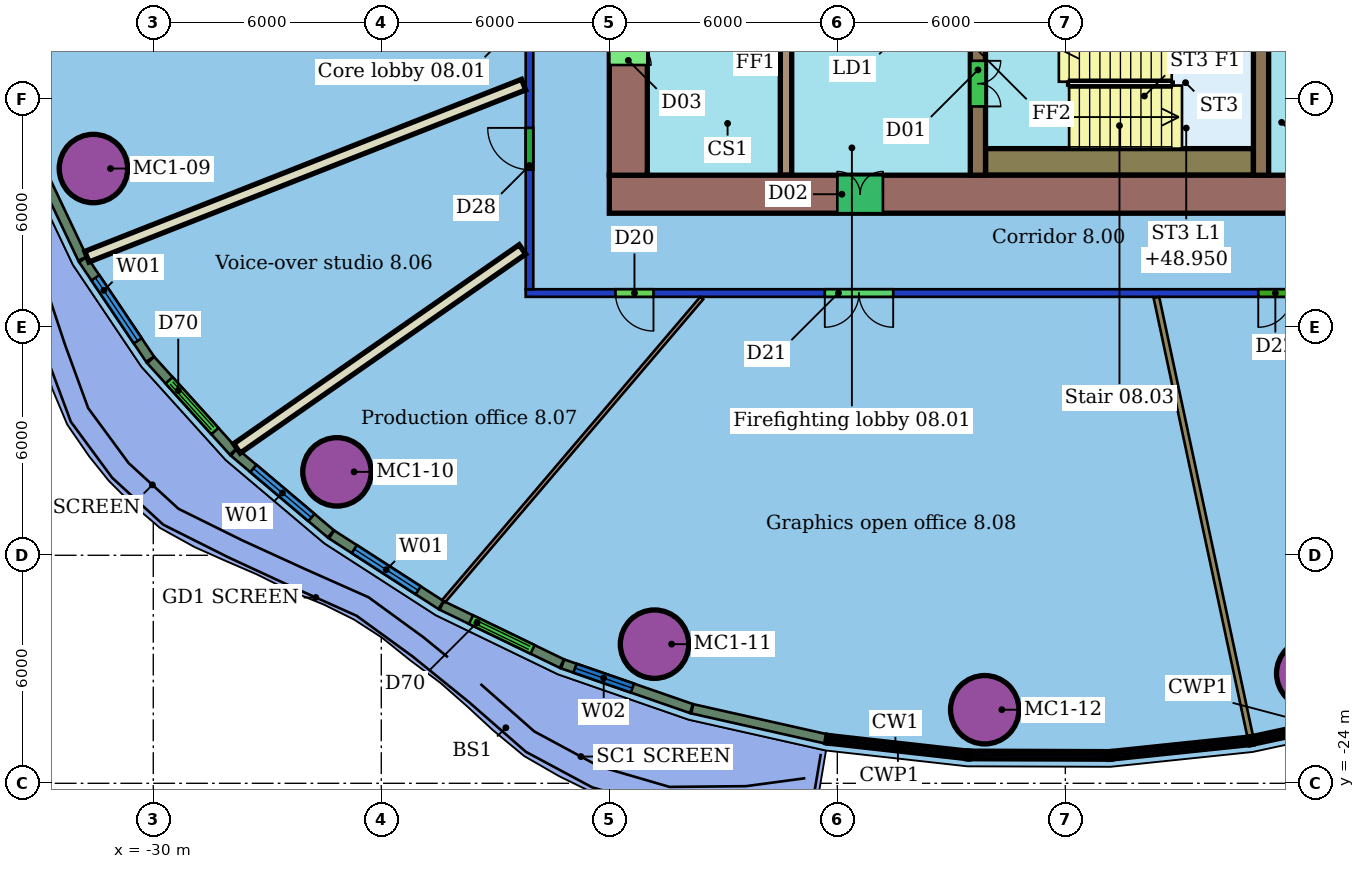
"""IFC4 building model, lengths in metres.
Left out: names, types, materials, properties, quantities, classifications, styles, units other than length and angle.
Written with IfcOpenShell. Run it as: python <this file> out.ifc"""

import sys

from ifc_helpers import new_model, si_unit, direction, frame, frame_2d, origin, origin_2d, place, context, subcontext, project, spatial, rectangle, hollow_circle, extrude, element, fill, save


model = new_model("IFC4")
c1 = context("Model", 3, precision=1e-05, world=origin(), true_north=direction((0.0, 1.0)))
c2 = subcontext(c1, "Body", "Model", "MODEL_VIEW")
j1 = project(units=[si_unit("LENGTHUNIT", "METRE"), si_unit("PLANEANGLEUNIT", "RADIAN")], contexts=[c1])
p1 = place(None, origin())
s1 = spatial("IfcSite", under=j1, at=p1, CompositionType="ELEMENT")
p2 = place(p1, origin())
s2 = spatial("IfcBuilding", under=s1, at=p2, CompositionType="ELEMENT")
p3 = place(p2, frame((0.0, 0.0, 47.1)))
s3 = spatial("IfcBuildingStorey", under=s2, at=p3, CompositionType="ELEMENT", Elevation=47.1)
for number, where, z_axis, x_axis in (
    (1, (-31.575, -7.824, 0.0), (0.0, 0.0, 1.0), (1.0, 0.0, 0.0)),
    (2, (-25.166, -15.805, 0.0), (0.0, 0.0, 1.0), (1.0, 0.0, 0.0)),
    (3, (-16.81, -20.339, 0.0), (0.0, 0.0, 1.0), (1.0, 0.0, 0.0)),
    (4, (-8.121, -22.064, 0.0), (0.0, 0.0, 1.0), (1.0, 0.0, 0.0)),
    (5, (0.458, -21.108, 0.0), (0.0, 0.0, 1.0), (1.0, 0.0, 0.0)),
):
    element("IfcColumn", number, at=place(p3, frame(where, z_axis=z_axis, x_axis=x_axis)), inside=s3, PredefinedType="COLUMN", context=c2, shape_type="SweptSolid", body=[
        extrude(hollow_circle(Radius=0.9, WallThickness=0.06, at=origin_2d()), origin(), (0.0, 0.0, 1.0), 3.55),
    ])
p4 = place(p3, frame((8.2, -11.1, 0.0), z_axis=(0.0, 0.0, 1.0), x_axis=(-1.0, 0.0, 0.0)))
e6 = element("IfcWall", 6, at=p4, inside=s3, PredefinedType="PARTITIONING", context=c2, shape_type="SweptSolid", body=[
    extrude(rectangle(XDim=28.4, YDim=0.2, at=frame_2d((14.2, 0.0))), origin(), (0.0, 0.0, 1.0), 2.85),
])
p5 = place(p4, frame((25.038, 0.0, 0.0)))
e7 = element("IfcOpeningElement", 7, at=p5, cuts=e6, PredefinedType="OPENING", context=c2, shape_type="SweptSolid", body=[
    extrude(rectangle(XDim=1.0, YDim=2.1, at=frame_2d((0.5, 1.05))), frame((0.0, 0.11, 0.0), z_axis=(0.0, -1.0, 0.0), x_axis=(1.0, 0.0, 0.0)), (0.0, 0.0, 1.0), 0.22),
])
p6 = place(p4, frame((18.73, 0.0, 0.0)))
e8 = element("IfcOpeningElement", 8, at=p6, cuts=e6, PredefinedType="OPENING", context=c2, shape_type="SweptSolid", body=[
    extrude(rectangle(XDim=1.8, YDim=2.1, at=frame_2d((0.9, 1.05))), frame((0.0, 0.11, 0.0), z_axis=(0.0, -1.0, 0.0), x_axis=(1.0, 0.0, 0.0)), (0.0, 0.0, 1.0), 0.22),
])
p7 = place(p4, frame((8.223, 0.0, 0.0)))
e9 = element("IfcOpeningElement", 9, at=p7, cuts=e6, PredefinedType="OPENING", context=c2, shape_type="SweptSolid", body=[
    extrude(rectangle(XDim=0.9, YDim=2.1, at=frame_2d((0.45, 1.05))), frame((0.0, 0.11, 0.0), z_axis=(0.0, -1.0, 0.0), x_axis=(1.0, 0.0, 0.0)), (0.0, 0.0, 1.0), 0.22),
])
p8 = place(p3, frame((-20.1, -11.0, 0.0), z_axis=(0.0, 0.0, 1.0), x_axis=(0.0, 1.0, 0.0)))
e10 = element("IfcWall", 10, at=p8, inside=s3, PredefinedType="PARTITIONING", context=c2, shape_type="SweptSolid", body=[
    extrude(rectangle(XDim=22.0, YDim=0.2, at=frame_2d((11.0, 0.0))), origin(), (0.0, 0.0, 1.0), 2.85),
])
p9 = place(p8, frame((8.49, 0.0, 0.0)))
e11 = element("IfcOpeningElement", 11, at=p9, cuts=e10, PredefinedType="OPENING", context=c2, shape_type="SweptSolid", body=[
    extrude(rectangle(XDim=1.8, YDim=2.1, at=frame_2d((0.9, 1.05))), frame((0.0, 0.11, 0.0), z_axis=(0.0, -1.0, 0.0), x_axis=(1.0, 0.0, 0.0)), (0.0, 0.0, 1.0), 0.22),
])
p10 = place(p8, frame((3.146, 0.0, 0.0)))
e12 = element("IfcOpeningElement", 12, at=p10, cuts=e10, PredefinedType="OPENING", context=c2, shape_type="SweptSolid", body=[
    extrude(rectangle(XDim=1.1, YDim=2.1, at=frame_2d((0.55, 1.05))), frame((0.0, 0.11, 0.0), z_axis=(0.0, -1.0, 0.0), x_axis=(1.0, 0.0, 0.0)), (0.0, 0.0, 1.0), 0.22),
])
p11 = place(p3, frame((-31.747, -10.144, 0.0), z_axis=(0.0, 0.0, 1.0), x_axis=(0.930393072446, 0.366563406172, 0.0)))
e13 = element("IfcWall", 13, at=p11, inside=s3, PredefinedType="PARTITIONING", context=c2, shape_type="SweptSolid", body=[
    extrude(rectangle(XDim=12.352, YDim=0.3, at=frame_2d((6.176, 0.0))), origin(), (0.0, 0.0, 1.0), 3.55),
])
p12 = place(p3, frame((-27.799, -15.188, 0.0), z_axis=(0.0, 0.0, 1.0), x_axis=(0.820483813594, 0.571669757491, 0.0)))
e14 = element("IfcWall", 14, at=p12, inside=s3, PredefinedType="PARTITIONING", context=c2, shape_type="SweptSolid", body=[
    extrude(rectangle(XDim=9.157, YDim=0.3, at=frame_2d((4.578, 0.0))), origin(), (0.0, 0.0, 1.0), 3.55),
])
p13 = place(p3, frame((-22.359, -19.206, 0.0), z_axis=(0.0, 0.0, 1.0), x_axis=(0.648419428032, 0.761283288501, 0.0)))
e15 = element("IfcWall", 15, at=p13, inside=s3, PredefinedType="PARTITIONING", context=c2, shape_type="SweptSolid", body=[
    extrude(rectangle(XDim=10.474, YDim=0.1, at=frame_2d((5.237, 0.0))), origin(), (0.0, 0.0, 1.0), 3.55),
])
p14 = place(p3, frame((-1.138, -22.756, 0.0), z_axis=(0.0, 0.0, 1.0), x_axis=(-0.208954012669, 0.977925467809, 0.0)))
e16 = element("IfcWall", 16, at=p14, inside=s3, PredefinedType="PARTITIONING", context=c2, shape_type="SweptSolid", body=[
    extrude(rectangle(XDim=11.801, YDim=0.15, at=frame_2d((5.9, 0.0))), origin(), (0.0, 0.0, 1.0), 3.55),
])
p15 = place(p3, frame((-33.168, -7.439, 0.0), z_axis=(0.0, 0.0, 1.0), x_axis=(0.428609341076, -0.903489918451, 0.0)))
e17 = element("IfcWall", 17, at=p15, inside=s3, PredefinedType="SOLIDWALL", context=c2, shape_type="SweptSolid", body=[
    extrude(rectangle(XDim=3.05, YDim=0.25, at=frame_2d((1.525, 0.0))), origin(), (0.0, 0.0, 1.0), 3.15),
])
p16 = place(p3, frame((-31.848, -10.217, 0.0), z_axis=(0.0, 0.0, 1.0), x_axis=(0.558028768247, -0.829821603605, 0.0)))
e18 = element("IfcWall", 18, at=p16, inside=s3, PredefinedType="SOLIDWALL", context=c2, shape_type="SweptSolid", body=[
    extrude(rectangle(XDim=3.161, YDim=0.25, at=frame_2d((1.581, 0.0))), origin(), (0.0, 0.0, 1.0), 3.15),
])
p17 = place(p16, frame((0.58, 0.0, 0.8)))
e19 = element("IfcOpeningElement", 19, at=p17, cuts=e18, PredefinedType="OPENING", context=c2, shape_type="SweptSolid", body=[
    extrude(rectangle(XDim=2.0, YDim=2.2, at=frame_2d((1.0, 1.1))), frame((0.0, 0.135, 0.0), z_axis=(0.0, -1.0, 0.0), x_axis=(1.0, 0.0, 0.0)), (0.0, 0.0, 1.0), 0.27),
])
p18 = place(p3, frame((-30.068, -12.861, 0.0), z_axis=(0.0, 0.0, 1.0), x_axis=(0.670103092784, -0.742268041237, 0.0)))
e20 = element("IfcWall", 20, at=p18, inside=s3, PredefinedType="SOLIDWALL", context=c2, shape_type="SweptSolid", body=[
    extrude(rectangle(XDim=3.244, YDim=0.25, at=frame_2d((1.622, 0.0))), origin(), (0.0, 0.0, 1.0), 3.15),
])
p19 = place(p18, frame((0.722, 0.0, 0.0)))
e21 = element("IfcOpeningElement", 21, at=p19, cuts=e20, PredefinedType="OPENING", context=c2, shape_type="SweptSolid", body=[
    extrude(rectangle(XDim=1.8, YDim=2.4, at=frame_2d((0.9, 1.2))), frame((0.0, 0.135, 0.0), z_axis=(0.0, -1.0, 0.0), x_axis=(1.0, 0.0, 0.0)), (0.0, 0.0, 1.0), 0.27),
])
p20 = place(p3, frame((-27.876, -15.286, 0.0), z_axis=(0.0, 0.0, 1.0), x_axis=(0.764082841582, -0.645118137398, 0.0)))
e22 = element("IfcWall", 22, at=p20, inside=s3, PredefinedType="SOLIDWALL", context=c2, shape_type="SweptSolid", body=[
    extrude(rectangle(XDim=3.335, YDim=0.25, at=frame_2d((1.667, 0.0))), origin(), (0.0, 0.0, 1.0), 3.15),
])
p21 = place(p20, frame((0.667, 0.0, 0.8)))
e23 = element("IfcOpeningElement", 23, at=p21, cuts=e22, PredefinedType="OPENING", context=c2, shape_type="SweptSolid", body=[
    extrude(rectangle(XDim=2.0, YDim=2.2, at=frame_2d((1.0, 1.1))), frame((0.0, 0.135, 0.0), z_axis=(0.0, -1.0, 0.0), x_axis=(1.0, 0.0, 0.0)), (0.0, 0.0, 1.0), 0.27),
])
p22 = place(p3, frame((-25.309, -17.452, 0.0), z_axis=(0.0, 0.0, 1.0), x_axis=(0.840374130765, -0.54200675304, 0.0)))
e24 = element("IfcWall", 24, at=p22, inside=s3, PredefinedType="SOLIDWALL", context=c2, shape_type="SweptSolid", body=[
    extrude(rectangle(XDim=3.426, YDim=0.25, at=frame_2d((1.713, 0.0))), origin(), (0.0, 0.0, 1.0), 3.15),
])
p23 = place(p22, frame((0.713, 0.0, 0.8)))
e25 = element("IfcOpeningElement", 25, at=p23, cuts=e24, PredefinedType="OPENING", context=c2, shape_type="SweptSolid", body=[
    extrude(rectangle(XDim=2.0, YDim=2.2, at=frame_2d((1.0, 1.1))), frame((0.0, 0.135, 0.0), z_axis=(0.0, -1.0, 0.0), x_axis=(1.0, 0.0, 0.0)), (0.0, 0.0, 1.0), 0.27),
])
p24 = place(p3, frame((-22.409, -19.32, 0.0), z_axis=(0.0, 0.0, 1.0), x_axis=(0.900150457919, -0.435579100862, 0.0)))
e26 = element("IfcWall", 26, at=p24, inside=s3, PredefinedType="SOLIDWALL", context=c2, shape_type="SweptSolid", body=[
    extrude(rectangle(XDim=3.511, YDim=0.25, at=frame_2d((1.756, 0.0))), origin(), (0.0, 0.0, 1.0), 3.15),
])
p25 = place(p24, frame((0.856, 0.0, 0.0)))
e27 = element("IfcOpeningElement", 27, at=p25, cuts=e26, PredefinedType="OPENING", context=c2, shape_type="SweptSolid", body=[
    extrude(rectangle(XDim=1.8, YDim=2.4, at=frame_2d((0.9, 1.2))), frame((0.0, 0.135, 0.0), z_axis=(0.0, -1.0, 0.0), x_axis=(1.0, 0.0, 0.0)), (0.0, 0.0, 1.0), 0.27),
])
p26 = place(p3, frame((-19.227, -20.858, 0.0), z_axis=(0.0, 0.0, 1.0), x_axis=(0.944816817468, -0.327599116956, 0.0)))
e28 = element("IfcWall", 28, at=p26, inside=s3, PredefinedType="SOLIDWALL", context=c2, shape_type="SweptSolid", body=[
    extrude(rectangle(XDim=3.587, YDim=0.25, at=frame_2d((1.793, 0.0))), origin(), (0.0, 0.0, 1.0), 3.15),
])
p27 = place(p26, frame((0.343, 0.0, 0.8)))
e29 = element("IfcOpeningElement", 29, at=p27, cuts=e28, PredefinedType="OPENING", context=c2, shape_type="SweptSolid", body=[
    extrude(rectangle(XDim=1.6, YDim=2.2, at=frame_2d((0.8, 1.1))), frame((0.0, 0.135, 0.0), z_axis=(0.0, -1.0, 0.0), x_axis=(1.0, 0.0, 0.0)), (0.0, 0.0, 1.0), 0.27),
])
p28 = place(p3, frame((-15.817, -22.04, 0.0), z_axis=(0.0, 0.0, 1.0), x_axis=(0.975672486329, -0.21923320784, 0.0)))
e30 = element("IfcWall", 30, at=p28, inside=s3, PredefinedType="SOLIDWALL", context=c2, shape_type="SweptSolid", body=[
    extrude(rectangle(XDim=3.603, YDim=0.25, at=frame_2d((1.801, 0.0))), origin(), (0.0, 0.0, 1.0), 3.15),
])
p29 = place(p3, frame((-18.0, -8.5, 0.0), z_axis=(0.0, 0.0, 1.0), x_axis=(1.0, 0.0, 0.0)))
e31 = element("IfcWall", 31, at=p29, inside=s3, PredefinedType="SHEAR", context=c2, shape_type="SweptSolid", body=[
    extrude(rectangle(XDim=24.0, YDim=1.0, at=frame_2d((12.0, 0.0))), origin(), (0.0, 0.0, 1.0), 3.4),
])
p30 = place(p29, frame((6.0, 0.0, 0.0)))
e32 = element("IfcOpeningElement", 32, at=p30, cuts=e31, PredefinedType="OPENING", context=c2, shape_type="SweptSolid", body=[
    extrude(rectangle(XDim=1.2, YDim=2.1, at=frame_2d((0.6, 1.05))), frame((0.0, 0.51, 0.0), z_axis=(0.0, -1.0, 0.0), x_axis=(1.0, 0.0, 0.0)), (0.0, 0.0, 1.0), 1.02),
])
p31 = place(p3, frame((-17.5, 8.0, 0.0), z_axis=(0.0, 0.0, 1.0), x_axis=(0.0, -1.0, 0.0)))
e33 = element("IfcWall", 33, at=p31, inside=s3, PredefinedType="SHEAR", context=c2, shape_type="SweptSolid", body=[
    extrude(rectangle(XDim=16.0, YDim=1.0, at=frame_2d((8.0, 0.0))), origin(), (0.0, 0.0, 1.0), 3.4),
])
p32 = place(p31, frame((11.9, 0.0, 0.0)))
e34 = element("IfcOpeningElement", 34, at=p32, cuts=e33, PredefinedType="OPENING", context=c2, shape_type="SweptSolid", body=[
    extrude(rectangle(XDim=1.2, YDim=2.1, at=frame_2d((0.6, 1.05))), frame((0.0, 0.51, 0.0), z_axis=(0.0, -1.0, 0.0), x_axis=(1.0, 0.0, 0.0)), (0.0, 0.0, 1.0), 1.02),
])
p33 = place(p31, frame((2.9, 0.0, 0.0)))
e35 = element("IfcOpeningElement", 35, at=p33, cuts=e33, PredefinedType="OPENING", context=c2, shape_type="SweptSolid", body=[
    extrude(rectangle(XDim=1.2, YDim=2.1, at=frame_2d((0.6, 1.05))), frame((0.0, 0.51, 0.0), z_axis=(0.0, -1.0, 0.0), x_axis=(1.0, 0.0, 0.0)), (0.0, 0.0, 1.0), 1.02),
])
p34 = place(p3, frame((-13.35, 8.0, 0.0), z_axis=(0.0, 0.0, 1.0), x_axis=(0.0, -1.0, 0.0)))
e36 = element("IfcWall", 36, at=p34, inside=s3, PredefinedType="SHEAR", context=c2, shape_type="SweptSolid", body=[
    extrude(rectangle(XDim=16.0, YDim=0.3, at=frame_2d((8.0, 0.0))), origin(), (0.0, 0.0, 1.0), 3.4),
])
p35 = place(p34, frame((7.25, 0.0, 0.0)))
e37 = element("IfcOpeningElement", 37, at=p35, cuts=e36, PredefinedType="OPENING", context=c2, shape_type="SweptSolid", body=[
    extrude(rectangle(XDim=1.5, YDim=2.1, at=frame_2d((0.75, 1.05))), frame((0.0, 0.16, 0.0), z_axis=(0.0, -1.0, 0.0), x_axis=(1.0, 0.0, 0.0)), (0.0, 0.0, 1.0), 0.32),
])
p36 = place(p3, frame((-8.3, -3.88, 0.0), z_axis=(0.0, 0.0, 1.0), x_axis=(0.0, -1.0, 0.0)))
e38 = element("IfcWall", 38, at=p36, inside=s3, PredefinedType="SHEAR", context=c2, shape_type="SweptSolid", body=[
    extrude(rectangle(XDim=4.12, YDim=0.4, at=frame_2d((2.06, 0.0))), origin(), (0.0, 0.0, 1.0), 3.4),
])
p37 = place(p36, frame((1.11, 0.0, 0.0)))
e39 = element("IfcOpeningElement", 39, at=p37, cuts=e38, PredefinedType="OPENING", context=c2, shape_type="SweptSolid", body=[
    extrude(rectangle(XDim=1.2, YDim=2.1, at=frame_2d((0.6, 1.05))), frame((0.0, 0.21, 0.0), z_axis=(0.0, -1.0, 0.0), x_axis=(1.0, 0.0, 0.0)), (0.0, 0.0, 1.0), 0.42),
])
p38 = place(p3, frame((-0.85, -3.88, 0.0), z_axis=(0.0, 0.0, 1.0), x_axis=(0.0, -1.0, 0.0)))
e40 = element("IfcWall", 40, at=p38, inside=s3, PredefinedType="SHEAR", context=c2, shape_type="SweptSolid", body=[
    extrude(rectangle(XDim=4.12, YDim=0.4, at=frame_2d((2.06, 0.0))), origin(), (0.0, 0.0, 1.0), 3.4),
])
p39 = place(p3, frame((-8.1, -7.65, 0.0), z_axis=(0.0, 0.0, 1.0), x_axis=(1.0, 0.0, 0.0)))
e41 = element("IfcWall", 41, at=p39, inside=s3, PredefinedType="SHEAR", context=c2, shape_type="SweptSolid", body=[
    extrude(rectangle(XDim=7.05, YDim=0.7, at=frame_2d((3.525, 0.0))), origin(), (0.0, 0.0, 1.0), 3.4),
])
p40 = place(p10, origin())
e42 = element("IfcDoor", 42, at=p40, inside=s3, OperationType="SINGLE_SWING_RIGHT", PredefinedType="DOOR", context=c2, shape_type="SweptSolid", body=[
    extrude(rectangle(XDim=1.1, YDim=2.1, at=frame_2d((0.55, 1.05))), frame((0.0, 0.025, 0.0), z_axis=(0.0, -1.0, 0.0), x_axis=(1.0, 0.0, 0.0)), (0.0, 0.0, 1.0), 0.05),
])
fill(e12, e42)
p41 = place(p5, origin())
e43 = element("IfcDoor", 43, at=p41, inside=s3, OperationType="SINGLE_SWING_LEFT", PredefinedType="DOOR", context=c2, shape_type="SweptSolid", body=[
    extrude(rectangle(XDim=1.0, YDim=2.1, at=frame_2d((0.5, 1.05))), frame((0.0, 0.025, 0.0), z_axis=(0.0, -1.0, 0.0), x_axis=(1.0, 0.0, 0.0)), (0.0, 0.0, 1.0), 0.05),
])
fill(e7, e43)
p42 = place(p6, origin())
e44 = element("IfcDoor", 44, at=p42, inside=s3, OperationType="DOUBLE_DOOR_SINGLE_SWING", PredefinedType="DOOR", context=c2, shape_type="SweptSolid", body=[
    extrude(rectangle(XDim=1.8, YDim=2.1, at=frame_2d((0.9, 1.05))), frame((0.0, 0.025, 0.0), z_axis=(0.0, -1.0, 0.0), x_axis=(1.0, 0.0, 0.0)), (0.0, 0.0, 1.0), 0.05),
])
fill(e8, e44)
p43 = place(p7, origin())
e45 = element("IfcDoor", 45, at=p43, inside=s3, OperationType="SINGLE_SWING_RIGHT", PredefinedType="DOOR", context=c2, shape_type="SweptSolid", body=[
    extrude(rectangle(XDim=0.9, YDim=2.1, at=frame_2d((0.45, 1.05))), frame((0.0, 0.025, 0.0), z_axis=(0.0, -1.0, 0.0), x_axis=(1.0, 0.0, 0.0)), (0.0, 0.0, 1.0), 0.05),
])
fill(e9, e45)
p44 = place(p17, origin())
e46 = element("IfcWindow", 46, at=p44, inside=s3, PartitioningType="SINGLE_PANEL", PredefinedType="WINDOW", context=c2, shape_type="SweptSolid", body=[
    extrude(rectangle(XDim=2.0, YDim=2.2, at=frame_2d((1.0, 1.1))), frame((0.0, 0.03, 0.0), z_axis=(0.0, -1.0, 0.0), x_axis=(1.0, 0.0, 0.0)), (0.0, 0.0, 1.0), 0.06),
])
fill(e19, e46)
p45 = place(p19, origin())
e47 = element("IfcDoor", 47, at=p45, inside=s3, OperationType="DOUBLE_DOOR_SLIDING", PredefinedType="DOOR", context=c2, shape_type="SweptSolid", body=[
    extrude(rectangle(XDim=1.8, YDim=2.4, at=frame_2d((0.9, 1.2))), frame((0.0, 0.025, 0.0), z_axis=(0.0, -1.0, 0.0), x_axis=(1.0, 0.0, 0.0)), (0.0, 0.0, 1.0), 0.05),
])
fill(e21, e47)
p46 = place(p21, origin())
e48 = element("IfcWindow", 48, at=p46, inside=s3, PartitioningType="SINGLE_PANEL", PredefinedType="WINDOW", context=c2, shape_type="SweptSolid", body=[
    extrude(rectangle(XDim=2.0, YDim=2.2, at=frame_2d((1.0, 1.1))), frame((0.0, 0.03, 0.0), z_axis=(0.0, -1.0, 0.0), x_axis=(1.0, 0.0, 0.0)), (0.0, 0.0, 1.0), 0.06),
])
fill(e23, e48)
p47 = place(p23, origin())
e49 = element("IfcWindow", 49, at=p47, inside=s3, PartitioningType="SINGLE_PANEL", PredefinedType="WINDOW", context=c2, shape_type="SweptSolid", body=[
    extrude(rectangle(XDim=2.0, YDim=2.2, at=frame_2d((1.0, 1.1))), frame((0.0, 0.03, 0.0), z_axis=(0.0, -1.0, 0.0), x_axis=(1.0, 0.0, 0.0)), (0.0, 0.0, 1.0), 0.06),
])
fill(e25, e49)
p48 = place(p25, origin())
e50 = element("IfcDoor", 50, at=p48, inside=s3, OperationType="DOUBLE_DOOR_SLIDING", PredefinedType="DOOR", context=c2, shape_type="SweptSolid", body=[
    extrude(rectangle(XDim=1.8, YDim=2.4, at=frame_2d((0.9, 1.2))), frame((0.0, 0.025, 0.0), z_axis=(0.0, -1.0, 0.0), x_axis=(1.0, 0.0, 0.0)), (0.0, 0.0, 1.0), 0.05),
])
fill(e27, e50)
p49 = place(p27, origin())
e51 = element("IfcWindow", 51, at=p49, inside=s3, PartitioningType="SINGLE_PANEL", PredefinedType="WINDOW", context=c2, shape_type="SweptSolid", body=[
    extrude(rectangle(XDim=1.6, YDim=2.2, at=frame_2d((0.8, 1.1))), frame((0.0, 0.03, 0.0), z_axis=(0.0, -1.0, 0.0), x_axis=(1.0, 0.0, 0.0)), (0.0, 0.0, 1.0), 0.06),
])
fill(e29, e51)
p50 = place(p30, origin())
e52 = element("IfcDoor", 52, at=p50, inside=s3, OperationType="DOUBLE_DOOR_SINGLE_SWING", PredefinedType="NOTDEFINED", context=c2, shape_type="SweptSolid", body=[
    extrude(rectangle(XDim=1.2, YDim=2.1, at=frame_2d((0.6, 1.05))), frame((0.0, 0.025, 0.0), z_axis=(0.0, -1.0, 0.0), x_axis=(1.0, 0.0, 0.0)), (0.0, 0.0, 1.0), 0.05),
])
fill(e32, e52)
p51 = place(p32, origin())
e53 = element("IfcDoor", 53, at=p51, inside=s3, OperationType="DOUBLE_DOOR_SINGLE_SWING", PredefinedType="NOTDEFINED", context=c2, shape_type="SweptSolid", body=[
    extrude(rectangle(XDim=1.2, YDim=2.1, at=frame_2d((0.6, 1.05))), frame((0.0, 0.025, 0.0), z_axis=(0.0, -1.0, 0.0), x_axis=(1.0, 0.0, 0.0)), (0.0, 0.0, 1.0), 0.05),
])
fill(e34, e53)
p52 = place(p37, origin())
e54 = element("IfcDoor", 54, at=p52, inside=s3, OperationType="DOUBLE_DOOR_SINGLE_SWING", PredefinedType="NOTDEFINED", context=c2, shape_type="SweptSolid", body=[
    extrude(rectangle(XDim=1.2, YDim=2.1, at=frame_2d((0.6, 1.05))), frame((0.0, 0.025, 0.0), z_axis=(0.0, -1.0, 0.0), x_axis=(1.0, 0.0, 0.0)), (0.0, 0.0, 1.0), 0.05),
])
fill(e39, e54)
save(model, sys.argv[1])
